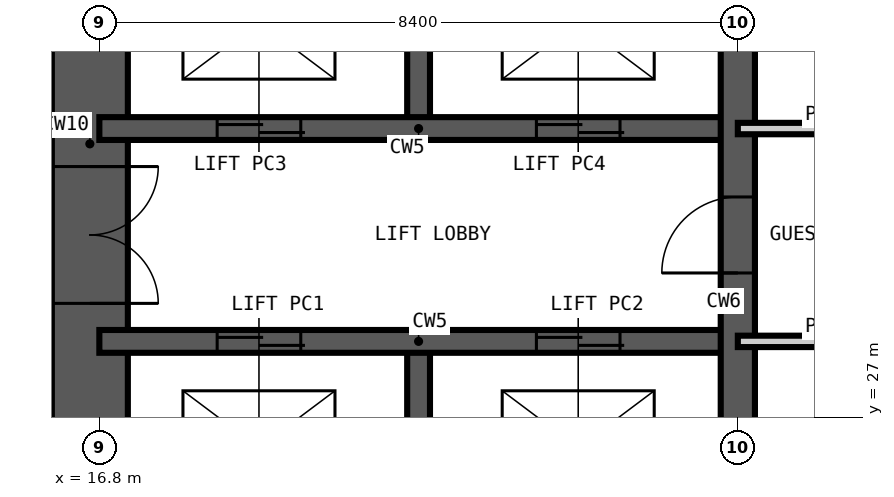
"""IFC4 building model, lengths in metres.
Left out: names, types, materials, properties, quantities, classifications, styles, units other than length and angle.
Written with IfcOpenShell. Run it as: python <this file> out.ifc"""

import sys

from ifc_helpers import new_model, si_unit, direction, frame, frame_2d, origin, place, context, subcontext, project, spatial, rectangle, extrude, element, fill, save


model = new_model("IFC4")
c1 = context("Model", 3, precision=1e-05, world=origin(), true_north=direction((0.0, 1.0)))
c2 = subcontext(c1, "Body", "Model", "MODEL_VIEW")
j1 = project(units=[si_unit("LENGTHUNIT", "METRE"), si_unit("PLANEANGLEUNIT", "RADIAN")], contexts=[c1])
p1 = place(None, origin())
s1 = spatial("IfcSite", under=j1, at=p1, CompositionType="ELEMENT")
p2 = place(p1, origin())
s2 = spatial("IfcBuilding", under=s1, at=p2, CompositionType="ELEMENT")
p3 = place(p2, frame((0.0, 0.0, 122.4)))
s3 = spatial("IfcBuildingStorey", under=s2, at=p3, CompositionType="ELEMENT", Elevation=122.4)
p4 = place(p3, frame((16.675, 41.625, -0.35), z_axis=(0.0, 0.0, 1.0), x_axis=(0.0, -1.0, 0.0)))
e1 = element("IfcWall", 1, at=p4, inside=s3, PredefinedType="SHEAR", context=c2, shape_type="SweptSolid", body=[
    extrude(rectangle(XDim=24.45, YDim=1.0, at=frame_2d((12.225, 0.0))), origin(), (0.0, 0.0, 1.0), 3.6),
])
p5 = place(p4, frame((11.325, 0.0, 0.35)))
e2 = element("IfcOpeningElement", 2, at=p5, cuts=e1, PredefinedType="OPENING", context=c2, shape_type="SweptSolid", body=[
    extrude(rectangle(XDim=1.8, YDim=2.2, at=frame_2d((0.9, 1.1))), frame((0.0, 0.51, 0.0), z_axis=(0.0, -1.0, 0.0), x_axis=(1.0, 0.0, 0.0)), (0.0, 0.0, 1.0), 1.02),
])
p6 = place(p4, frame((20.125, 0.0, 0.35)))
e3 = element("IfcOpeningElement", 3, at=p6, cuts=e1, PredefinedType="OPENING", context=c2, shape_type="SweptSolid", body=[
    extrude(rectangle(XDim=1.0, YDim=2.1, at=frame_2d((0.5, 1.05))), frame((0.0, 0.51, 0.0), z_axis=(0.0, -1.0, 0.0), x_axis=(1.0, 0.0, 0.0)), (0.0, 0.0, 1.0), 1.02),
])
p7 = place(p4, frame((5.425, 0.0, 0.35)))
e4 = element("IfcOpeningElement", 4, at=p7, cuts=e1, PredefinedType="OPENING", context=c2, shape_type="SweptSolid", body=[
    extrude(rectangle(XDim=1.0, YDim=2.1, at=frame_2d((0.5, 1.05))), frame((0.0, 0.51, 0.0), z_axis=(0.0, -1.0, 0.0), x_axis=(1.0, 0.0, 0.0)), (0.0, 0.0, 1.0), 1.02),
])
p8 = place(p3, frame((21.0, 22.4, -0.35), z_axis=(0.0, 0.0, 1.0), x_axis=(0.0, 1.0, 0.0)))
e5 = element("IfcWall", 5, at=p8, inside=s3, PredefinedType="SHEAR", context=c2, shape_type="SweptSolid", body=[
    extrude(rectangle(XDim=5.6, YDim=0.3, at=frame_2d((2.8, 0.0))), origin(), (0.0, 0.0, 1.0), 3.6),
])
p9 = place(p3, frame((21.0, 30.8, -0.35), z_axis=(0.0, 0.0, 1.0), x_axis=(0.0, 1.0, 0.0)))
e6 = element("IfcWall", 6, at=p9, inside=s3, PredefinedType="SHEAR", context=c2, shape_type="SweptSolid", body=[
    extrude(rectangle(XDim=2.8, YDim=0.3, at=frame_2d((1.4, 0.0))), origin(), (0.0, 0.0, 1.0), 3.6),
])
p10 = place(p3, frame((16.8, 28.0, -0.35), z_axis=(0.0, 0.0, 1.0), x_axis=(1.0, 0.0, 0.0)))
e7 = element("IfcWall", 7, at=p10, inside=s3, PredefinedType="SHEAR", context=c2, shape_type="SweptSolid", body=[
    extrude(rectangle(XDim=8.4, YDim=0.3, at=frame_2d((4.2, 0.0))), origin(), (0.0, 0.0, 1.0), 3.6),
])
p11 = place(p10, frame((1.55, 0.0, 0.35)))
e8 = element("IfcOpeningElement", 8, at=p11, cuts=e7, PredefinedType="OPENING", context=c2, shape_type="SweptSolid", body=[
    extrude(rectangle(XDim=1.1, YDim=2.2, at=frame_2d((0.55, 1.1))), frame((0.0, 0.16, 0.0), z_axis=(0.0, -1.0, 0.0), x_axis=(1.0, 0.0, 0.0)), (0.0, 0.0, 1.0), 0.32),
])
p12 = place(p10, frame((5.75, 0.0, 0.35)))
e9 = element("IfcOpeningElement", 9, at=p12, cuts=e7, PredefinedType="OPENING", context=c2, shape_type="SweptSolid", body=[
    extrude(rectangle(XDim=1.1, YDim=2.2, at=frame_2d((0.55, 1.1))), frame((0.0, 0.16, 0.0), z_axis=(0.0, -1.0, 0.0), x_axis=(1.0, 0.0, 0.0)), (0.0, 0.0, 1.0), 0.32),
])
p13 = place(p3, frame((16.8, 30.8, -0.35), z_axis=(0.0, 0.0, 1.0), x_axis=(1.0, 0.0, 0.0)))
e10 = element("IfcWall", 10, at=p13, inside=s3, PredefinedType="SHEAR", context=c2, shape_type="SweptSolid", body=[
    extrude(rectangle(XDim=8.4, YDim=0.3, at=frame_2d((4.2, 0.0))), origin(), (0.0, 0.0, 1.0), 3.6),
])
p14 = place(p13, frame((1.55, 0.0, 0.35)))
e11 = element("IfcOpeningElement", 11, at=p14, cuts=e10, PredefinedType="OPENING", context=c2, shape_type="SweptSolid", body=[
    extrude(rectangle(XDim=1.1, YDim=2.2, at=frame_2d((0.55, 1.1))), frame((0.0, 0.16, 0.0), z_axis=(0.0, -1.0, 0.0), x_axis=(1.0, 0.0, 0.0)), (0.0, 0.0, 1.0), 0.32),
])
p15 = place(p13, frame((5.75, 0.0, 0.35)))
e12 = element("IfcOpeningElement", 12, at=p15, cuts=e10, PredefinedType="OPENING", context=c2, shape_type="SweptSolid", body=[
    extrude(rectangle(XDim=1.1, YDim=2.2, at=frame_2d((0.55, 1.1))), frame((0.0, 0.16, 0.0), z_axis=(0.0, -1.0, 0.0), x_axis=(1.0, 0.0, 0.0)), (0.0, 0.0, 1.0), 0.32),
])
p16 = place(p3, frame((25.2, 16.8, -0.35), z_axis=(0.0, 0.0, 1.0), x_axis=(0.0, 1.0, 0.0)))
e13 = element("IfcWall", 13, at=p16, inside=s3, PredefinedType="SHEAR", context=c2, shape_type="SweptSolid", body=[
    extrude(rectangle(XDim=25.2, YDim=0.45, at=frame_2d((12.6, 0.0))), origin(), (0.0, 0.0, 1.0), 3.6),
])
p17 = place(p16, frame((12.1, 0.0, 0.35)))
e14 = element("IfcOpeningElement", 14, at=p17, cuts=e13, PredefinedType="OPENING", context=c2, shape_type="SweptSolid", body=[
    extrude(rectangle(XDim=1.0, YDim=2.1, at=frame_2d((0.5, 1.05))), frame((0.0, 0.235, 0.0), z_axis=(0.0, -1.0, 0.0), x_axis=(1.0, 0.0, 0.0)), (0.0, 0.0, 1.0), 0.47),
])
p18 = place(p3, frame((25.2, 28.0, 0.0), z_axis=(0.0, 0.0, 1.0), x_axis=(1.0, 0.0, 0.0)))
e15 = element("IfcWall", 15, at=p18, inside=s3, PredefinedType="PARTITIONING", context=c2, shape_type="SweptSolid", body=[
    extrude(rectangle(XDim=4.2, YDim=0.15, at=frame_2d((2.1, 0.0))), origin(), (0.0, 0.0, 1.0), 3.25),
])
p19 = place(p18, frame((1.6, 0.0, 0.0)))
e16 = element("IfcOpeningElement", 16, at=p19, cuts=e15, PredefinedType="OPENING", context=c2, shape_type="SweptSolid", body=[
    extrude(rectangle(XDim=1.0, YDim=2.1, at=frame_2d((0.5, 1.05))), frame((0.0, 0.085, 0.0), z_axis=(0.0, -1.0, 0.0), x_axis=(1.0, 0.0, 0.0)), (0.0, 0.0, 1.0), 0.17),
])
p20 = place(p3, frame((25.2, 30.8, 0.0), z_axis=(0.0, 0.0, 1.0), x_axis=(1.0, 0.0, 0.0)))
e17 = element("IfcWall", 17, at=p20, inside=s3, PredefinedType="PARTITIONING", context=c2, shape_type="SweptSolid", body=[
    extrude(rectangle(XDim=4.2, YDim=0.15, at=frame_2d((2.1, 0.0))), origin(), (0.0, 0.0, 1.0), 3.25),
])
p21 = place(p20, frame((1.6, 0.0, 0.0)))
e18 = element("IfcOpeningElement", 18, at=p21, cuts=e17, PredefinedType="OPENING", context=c2, shape_type="SweptSolid", body=[
    extrude(rectangle(XDim=1.0, YDim=2.1, at=frame_2d((0.5, 1.05))), frame((0.0, 0.085, 0.0), z_axis=(0.0, -1.0, 0.0), x_axis=(1.0, 0.0, 0.0)), (0.0, 0.0, 1.0), 0.17),
])
p22 = place(p11, origin())
e19 = element("IfcDoor", 19, at=p22, inside=s3, OperationType="DOUBLE_DOOR_SLIDING", PredefinedType="DOOR", context=c2, shape_type="SweptSolid", body=[
    extrude(rectangle(XDim=1.1, YDim=2.2, at=frame_2d((0.55, 1.1))), frame((0.0, 0.025, 0.0), z_axis=(0.0, -1.0, 0.0), x_axis=(1.0, 0.0, 0.0)), (0.0, 0.0, 1.0), 0.05),
])
fill(e8, e19)
p23 = place(p12, origin())
e20 = element("IfcDoor", 20, at=p23, inside=s3, OperationType="DOUBLE_DOOR_SLIDING", PredefinedType="DOOR", context=c2, shape_type="SweptSolid", body=[
    extrude(rectangle(XDim=1.1, YDim=2.2, at=frame_2d((0.55, 1.1))), frame((0.0, 0.025, 0.0), z_axis=(0.0, -1.0, 0.0), x_axis=(1.0, 0.0, 0.0)), (0.0, 0.0, 1.0), 0.05),
])
fill(e9, e20)
p24 = place(p14, origin())
e21 = element("IfcDoor", 21, at=p24, inside=s3, OperationType="DOUBLE_DOOR_SLIDING", PredefinedType="DOOR", context=c2, shape_type="SweptSolid", body=[
    extrude(rectangle(XDim=1.1, YDim=2.2, at=frame_2d((0.55, 1.1))), frame((0.0, 0.025, 0.0), z_axis=(0.0, -1.0, 0.0), x_axis=(1.0, 0.0, 0.0)), (0.0, 0.0, 1.0), 0.05),
])
fill(e11, e21)
p25 = place(p15, origin())
e22 = element("IfcDoor", 22, at=p25, inside=s3, OperationType="DOUBLE_DOOR_SLIDING", PredefinedType="DOOR", context=c2, shape_type="SweptSolid", body=[
    extrude(rectangle(XDim=1.1, YDim=2.2, at=frame_2d((0.55, 1.1))), frame((0.0, 0.025, 0.0), z_axis=(0.0, -1.0, 0.0), x_axis=(1.0, 0.0, 0.0)), (0.0, 0.0, 1.0), 0.05),
])
fill(e12, e22)
p26 = place(p5, origin())
e23 = element("IfcDoor", 23, at=p26, inside=s3, OperationType="DOUBLE_DOOR_DOUBLE_SWING", PredefinedType="DOOR", context=c2, shape_type="SweptSolid", body=[
    extrude(rectangle(XDim=1.8, YDim=2.2, at=frame_2d((0.9, 1.1))), frame((0.0, 0.025, 0.0), z_axis=(0.0, -1.0, 0.0), x_axis=(1.0, 0.0, 0.0)), (0.0, 0.0, 1.0), 0.05),
])
fill(e2, e23)
p27 = place(p17, origin())
e24 = element("IfcDoor", 24, at=p27, inside=s3, OperationType="SINGLE_SWING_LEFT", PredefinedType="DOOR", context=c2, shape_type="SweptSolid", body=[
    extrude(rectangle(XDim=1.0, YDim=2.1, at=frame_2d((0.5, 1.05))), frame((0.0, 0.025, 0.0), z_axis=(0.0, -1.0, 0.0), x_axis=(1.0, 0.0, 0.0)), (0.0, 0.0, 1.0), 0.05),
])
fill(e14, e24)
save(model, sys.argv[1])
